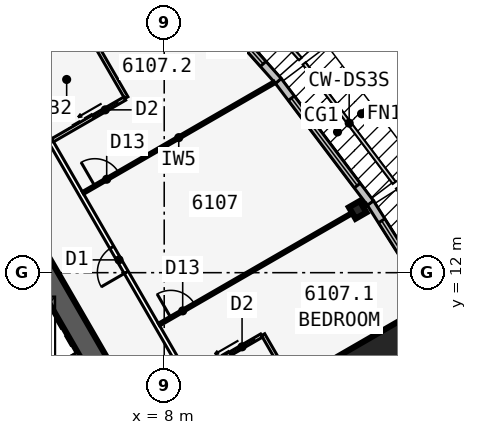
"""IFC4 building model, lengths in metres.
Left out: names, types, materials, properties, quantities, classifications, styles, units other than length and angle.
Written with IfcOpenShell. Run it as: python <this file> out.ifc"""

import sys

from ifc_helpers import new_model, si_unit, direction, frame, frame_2d, origin, origin_2d, place, context, subcontext, project, spatial, rectangle, i_section, extrude, element, fill, save


model = new_model("IFC4")
c1 = context("Model", 3, precision=1e-05, world=origin(), true_north=direction((0.0, 1.0)))
c2 = subcontext(c1, "Body", "Model", "MODEL_VIEW")
j1 = project(units=[si_unit("LENGTHUNIT", "METRE"), si_unit("PLANEANGLEUNIT", "RADIAN")], contexts=[c1])
p1 = place(None, origin())
s1 = spatial("IfcSite", under=j1, at=p1, CompositionType="ELEMENT")
p2 = place(p1, origin())
s2 = spatial("IfcBuilding", under=s1, at=p2, CompositionType="ELEMENT")
p3 = place(p2, frame((0.0, 0.0, 229.7)))
s3 = spatial("IfcBuildingStorey", under=s2, at=p3, CompositionType="ELEMENT", Elevation=229.7)
p4 = place(p3, frame((16.5, -9.526, 0.0), z_axis=(0.0, 0.0, 1.0), x_axis=(-0.499999749417, 0.866025548458, 0.0)))
e1 = element("IfcWall", 1, at=p4, inside=s3, PredefinedType="SHEAR", context=c2, shape_type="SweptSolid", body=[
    extrude(rectangle(XDim=33.0, YDim=0.75, at=frame_2d((16.5, 0.0))), origin(), (0.0, 0.0, 1.0), 3.6),
])
p5 = place(p4, frame((14.15, 0.0, 0.0)))
e2 = element("IfcOpeningElement", 2, at=p5, cuts=e1, PredefinedType="OPENING", context=c2, shape_type="SweptSolid", body=[
    extrude(rectangle(XDim=1.8, YDim=2.13, at=frame_2d((0.9, 1.065))), frame((0.0, 0.385, 0.0), z_axis=(0.0, -1.0, 0.0), x_axis=(1.0, 0.0, 0.0)), (0.0, 0.0, 1.0), 0.77),
])
p6 = place(p4, frame((12.6, 0.0, 0.0)))
e3 = element("IfcOpeningElement", 3, at=p6, cuts=e1, PredefinedType="OPENING", context=c2, shape_type="SweptSolid", body=[
    extrude(rectangle(XDim=1.0, YDim=2.13, at=frame_2d((0.5, 1.065))), frame((0.0, 0.385, 0.0), z_axis=(0.0, -1.0, 0.0), x_axis=(1.0, 0.0, 0.0)), (0.0, 0.0, 1.0), 0.77),
])
p7 = place(p3, frame((5.379, 2.586, 0.0), z_axis=(0.0, 0.0, 1.0), x_axis=(-0.500001375892, 0.866024609411, 0.0)))
e4 = element("IfcWall", 4, at=p7, inside=s3, PredefinedType="SOLIDWALL", context=c2, shape_type="SweptSolid", body=[
    extrude(rectangle(XDim=10.633, YDim=0.25, at=frame_2d((5.316, 0.0))), origin(), (0.0, 0.0, 1.0), 3.35),
])
p8 = place(p7, frame((9.164, 0.0, 0.0)))
e5 = element("IfcOpeningElement", 5, at=p8, cuts=e4, PredefinedType="OPENING", context=c2, shape_type="SweptSolid", body=[
    extrude(rectangle(XDim=0.9, YDim=2.13, at=frame_2d((0.45, 1.065))), frame((0.0, 0.135, 0.0), z_axis=(0.0, -1.0, 0.0), x_axis=(1.0, 0.0, 0.0)), (0.0, 0.0, 1.0), 0.27),
])
p9 = place(p7, frame((1.0, 0.0, 0.0)))
e6 = element("IfcOpeningElement", 6, at=p9, cuts=e4, PredefinedType="OPENING", context=c2, shape_type="SweptSolid", body=[
    extrude(rectangle(XDim=1.1, YDim=2.13, at=frame_2d((0.55, 1.065))), frame((0.0, 0.135, 0.0), z_axis=(0.0, -1.0, 0.0), x_axis=(1.0, 0.0, 0.0)), (0.0, 0.0, 1.0), 0.27),
])
p10 = place(p7, frame((3.9, 0.0, 0.0)))
e7 = element("IfcOpeningElement", 7, at=p10, cuts=e4, PredefinedType="OPENING", context=c2, shape_type="SweptSolid", body=[
    extrude(rectangle(XDim=1.1, YDim=2.13, at=frame_2d((0.55, 1.065))), frame((0.0, 0.135, 0.0), z_axis=(0.0, -1.0, 0.0), x_axis=(1.0, 0.0, 0.0)), (0.0, 0.0, 1.0), 0.27),
])
p11 = place(p7, frame((6.8, 0.0, 0.0)))
e8 = element("IfcOpeningElement", 8, at=p11, cuts=e4, PredefinedType="OPENING", context=c2, shape_type="SweptSolid", body=[
    extrude(rectangle(XDim=1.1, YDim=2.13, at=frame_2d((0.55, 1.065))), frame((0.0, 0.135, 0.0), z_axis=(0.0, -1.0, 0.0), x_axis=(1.0, 0.0, 0.0)), (0.0, 0.0, 1.0), 0.27),
])
p12 = place(p3, frame((2.429, 7.696, 0.0), z_axis=(0.0, 0.0, 1.0), x_axis=(0.866042017984, 0.499971222258, 0.0)))
e9 = element("IfcWall", 9, at=p12, inside=s3, PredefinedType="SOLIDWALL", context=c2, shape_type="SweptSolid", body=[
    extrude(rectangle(XDim=3.2, YDim=0.2, at=frame_2d((1.6, 0.0))), origin(), (0.0, 0.0, 1.0), 3.35),
])
p13 = place(p3, frame((14.363, 14.066, 0.0), z_axis=(0.0, 0.0, 1.0), x_axis=(0.866025403784, 0.5, 0.0)))
e10 = element("IfcColumn", 10, at=p13, inside=s3, PredefinedType="COLUMN", context=c2, shape_type="SweptSolid", body=[
    extrude(i_section(OverallWidth=0.411, OverallDepth=0.434, WebThickness=0.036, FlangeThickness=0.057, at=origin_2d()), origin(), (0.0, 0.0, 1.0), 3.6),
])
p14 = place(p3, frame((15.312, 8.84, 0.0), z_axis=(0.0, 0.0, 1.0), x_axis=(0.866025403784, 0.5, 0.0)))
e11 = element("IfcColumn", 11, at=p14, inside=s3, PredefinedType="COLUMN", context=c2, shape_type="SweptSolid", body=[
    extrude(rectangle(XDim=2.3, YDim=2.3, at=origin_2d()), origin(), (0.0, 0.0, 1.0), 3.6),
])
p15 = place(p3, frame((17.456, 10.072, 0.0), z_axis=(0.0, 0.0, 1.0), x_axis=(-0.535220361449, 0.844712474568, 0.0)))
e12 = element("IfcWall", 12, at=p15, inside=s3, PredefinedType="STANDARD", context=c2, shape_type="SweptSolid", body=[
    extrude(rectangle(XDim=5.004, YDim=0.25, at=frame_2d((2.502, 0.0))), origin(), (0.0, 0.0, 1.0), 3.35),
])
p16 = place(p15, frame((0.702, 0.0, 0.45)))
e13 = element("IfcOpeningElement", 13, at=p16, cuts=e12, PredefinedType="OPENING", context=c2, shape_type="SweptSolid", body=[
    extrude(rectangle(XDim=3.6, YDim=2.6, at=frame_2d((1.8, 1.3))), frame((0.0, 0.135, 0.0), z_axis=(0.0, -1.0, 0.0), x_axis=(1.0, 0.0, 0.0)), (0.0, 0.0, 1.0), 0.27),
])
p17 = place(p3, frame((14.783, 14.291, 0.0), z_axis=(0.0, 0.0, 1.0), x_axis=(-0.602408653511, 0.798187831388, 0.0)))
e14 = element("IfcWall", 14, at=p17, inside=s3, PredefinedType="STANDARD", context=c2, shape_type="SweptSolid", body=[
    extrude(rectangle(XDim=5.038, YDim=0.25, at=frame_2d((2.519, 0.0))), origin(), (0.0, 0.0, 1.0), 3.35),
])
p18 = place(p17, frame((0.719, 0.0, 0.45)))
e15 = element("IfcOpeningElement", 15, at=p18, cuts=e14, PredefinedType="OPENING", context=c2, shape_type="SweptSolid", body=[
    extrude(rectangle(XDim=3.6, YDim=2.6, at=frame_2d((1.8, 1.3))), frame((0.0, 0.135, 0.0), z_axis=(0.0, -1.0, 0.0), x_axis=(1.0, 0.0, 0.0)), (0.0, 0.0, 1.0), 0.27),
])
p19 = place(p3, frame((11.754, 18.304, 0.0), z_axis=(0.0, 0.0, 1.0), x_axis=(-0.664348996191, 0.747422511876, 0.0)))
e16 = element("IfcWall", 16, at=p19, inside=s3, PredefinedType="STANDARD", context=c2, shape_type="SweptSolid", body=[
    extrude(rectangle(XDim=5.105, YDim=0.25, at=frame_2d((2.552, 0.0))), origin(), (0.0, 0.0, 1.0), 3.35),
])
p20 = place(p19, frame((0.752, 0.0, 0.45)))
e17 = element("IfcOpeningElement", 17, at=p20, cuts=e16, PredefinedType="OPENING", context=c2, shape_type="SweptSolid", body=[
    extrude(rectangle(XDim=3.6, YDim=2.6, at=frame_2d((1.8, 1.3))), frame((0.0, 0.135, 0.0), z_axis=(0.0, -1.0, 0.0), x_axis=(1.0, 0.0, 0.0)), (0.0, 0.0, 1.0), 0.27),
])
p21 = place(p3, frame((20.102, -11.115, 0.0), z_axis=(0.0, 0.0, 1.0), x_axis=(-0.500000265775, 0.866025250339, 0.0)))
e18 = element("IfcWall", 18, at=p21, inside=s3, PredefinedType="PARTITIONING", context=c2, shape_type="SweptSolid", body=[
    extrude(rectangle(XDim=39.354, YDim=0.15, at=frame_2d((19.677, 0.0))), origin(), (0.0, 0.0, 1.0), 3.35),
])
p22 = place(p21, frame((1.102, 0.0, 0.0)))
e19 = element("IfcOpeningElement", 19, at=p22, cuts=e18, PredefinedType="OPENING", context=c2, shape_type="SweptSolid", body=[
    extrude(rectangle(XDim=0.95, YDim=2.13, at=frame_2d((0.475, 1.065))), frame((0.0, 0.085, 0.0), z_axis=(0.0, -1.0, 0.0), x_axis=(1.0, 0.0, 0.0)), (0.0, 0.0, 1.0), 0.17),
])
p23 = place(p21, frame((11.702, 0.0, 0.0)))
e20 = element("IfcOpeningElement", 20, at=p23, cuts=e18, PredefinedType="OPENING", context=c2, shape_type="SweptSolid", body=[
    extrude(rectangle(XDim=0.95, YDim=2.13, at=frame_2d((0.475, 1.065))), frame((0.0, 0.085, 0.0), z_axis=(0.0, -1.0, 0.0), x_axis=(1.0, 0.0, 0.0)), (0.0, 0.0, 1.0), 0.17),
])
p24 = place(p21, frame((26.702, 0.0, 0.0)))
e21 = element("IfcOpeningElement", 21, at=p24, cuts=e18, PredefinedType="OPENING", context=c2, shape_type="SweptSolid", body=[
    extrude(rectangle(XDim=0.95, YDim=2.13, at=frame_2d((0.475, 1.065))), frame((0.0, 0.085, 0.0), z_axis=(0.0, -1.0, 0.0), x_axis=(1.0, 0.0, 0.0)), (0.0, 0.0, 1.0), 0.17),
])
p25 = place(p21, frame((37.302, 0.0, 0.0)))
e22 = element("IfcOpeningElement", 22, at=p25, cuts=e18, PredefinedType="OPENING", context=c2, shape_type="SweptSolid", body=[
    extrude(rectangle(XDim=0.95, YDim=2.13, at=frame_2d((0.475, 1.065))), frame((0.0, 0.085, 0.0), z_axis=(0.0, -1.0, 0.0), x_axis=(1.0, 0.0, 0.0)), (0.0, 0.0, 1.0), 0.17),
])
p26 = place(p3, frame((10.329, 5.963, 0.0), z_axis=(0.0, 0.0, 1.0), x_axis=(0.866016460812, 0.500015489362, 0.0)))
e23 = element("IfcWall", 23, at=p26, inside=s3, PredefinedType="PARTITIONING", context=c2, shape_type="SweptSolid", body=[
    extrude(rectangle(XDim=8.101, YDim=0.15, at=frame_2d((4.051, 0.0))), origin(), (0.0, 0.0, 1.0), 2.309),
])
p27 = place(p3, frame((7.829, 10.293, 0.0), z_axis=(0.0, 0.0, 1.0), x_axis=(0.866030558329, 0.49999107196, 0.0)))
e24 = element("IfcWall", 24, at=p27, inside=s3, PredefinedType="PARTITIONING", context=c2, shape_type="SweptSolid", body=[
    extrude(rectangle(XDim=7.894, YDim=0.1, at=frame_2d((3.947, 0.0))), origin(), (0.0, 0.0, 1.0), 2.25),
])
p28 = place(p27, frame((0.45, 0.0, 0.0)))
e25 = element("IfcOpeningElement", 25, at=p28, cuts=e24, PredefinedType="OPENING", context=c2, shape_type="SweptSolid", body=[
    extrude(rectangle(XDim=0.9, YDim=2.13, at=frame_2d((0.45, 1.065))), frame((0.0, 0.06, 0.0), z_axis=(0.0, -1.0, 0.0), x_axis=(1.0, 0.0, 0.0)), (0.0, 0.0, 1.0), 0.12),
])
p29 = place(p3, frame((5.329, 14.623, 0.0), z_axis=(0.0, 0.0, 1.0), x_axis=(0.866017877653, 0.500013035415, 0.0)))
e26 = element("IfcWall", 26, at=p29, inside=s3, PredefinedType="PARTITIONING", context=c2, shape_type="SweptSolid", body=[
    extrude(rectangle(XDim=7.273, YDim=0.1, at=frame_2d((3.636, 0.0))), origin(), (0.0, 0.0, 1.0), 2.309),
])
p30 = place(p29, frame((0.45, 0.0, 0.0)))
e27 = element("IfcOpeningElement", 27, at=p30, cuts=e26, PredefinedType="OPENING", context=c2, shape_type="SweptSolid", body=[
    extrude(rectangle(XDim=0.9, YDim=2.13, at=frame_2d((0.45, 1.065))), frame((0.0, 0.06, 0.0), z_axis=(0.0, -1.0, 0.0), x_axis=(1.0, 0.0, 0.0)), (0.0, 0.0, 1.0), 0.12),
])
p31 = place(p3, frame((2.829, 18.954, 0.0), z_axis=(0.0, 0.0, 1.0), x_axis=(0.866026604282, 0.499997920671, 0.0)))
e28 = element("IfcWall", 28, at=p31, inside=s3, PredefinedType="PARTITIONING", context=c2, shape_type="SweptSolid", body=[
    extrude(rectangle(XDim=6.24, YDim=0.15, at=frame_2d((3.12, 0.0))), origin(), (0.0, 0.0, 1.0), 2.25),
])
p32 = place(p3, frame((12.753, 7.363, 0.0), z_axis=(0.0, 0.0, 1.0), x_axis=(-0.499990139034, 0.866031096941, 0.0)))
e29 = element("IfcWall", 29, at=p32, inside=s3, PredefinedType="PLUMBINGWALL", context=c2, shape_type="SweptSolid", body=[
    extrude(rectangle(XDim=3.0, YDim=0.12, at=frame_2d((1.5, 0.0))), origin(), (0.0, 0.0, 1.0), 3.35),
])
p33 = place(p3, frame((8.829, 8.561, 0.0), z_axis=(0.0, 0.0, 1.0), x_axis=(0.866035715982, 0.499982138324, 0.0)))
e30 = element("IfcWall", 30, at=p33, inside=s3, PredefinedType="PLUMBINGWALL", context=c2, shape_type="SweptSolid", body=[
    extrude(rectangle(XDim=2.74, YDim=0.12, at=frame_2d((1.37, 0.0))), origin(), (0.0, 0.0, 1.0), 3.35),
])
p34 = place(p33, frame((1.55, 0.0, 0.0)))
e31 = element("IfcOpeningElement", 31, at=p34, cuts=e30, PredefinedType="OPENING", context=c2, shape_type="SweptSolid", body=[
    extrude(rectangle(XDim=0.9, YDim=2.13, at=frame_2d((0.45, 1.065))), frame((0.0, 0.07, 0.0), z_axis=(0.0, -1.0, 0.0), x_axis=(1.0, 0.0, 0.0)), (0.0, 0.0, 1.0), 0.14),
])
p35 = place(p3, frame((6.753, 17.755, 0.0), z_axis=(0.0, 0.0, 1.0), x_axis=(-0.499990139034, 0.866031096941, 0.0)))
e32 = element("IfcWall", 32, at=p35, inside=s3, PredefinedType="PLUMBINGWALL", context=c2, shape_type="SweptSolid", body=[
    extrude(rectangle(XDim=3.0, YDim=0.12, at=frame_2d((1.5, 0.0))), origin(), (0.0, 0.0, 1.0), 3.35),
])
p36 = place(p3, frame((4.329, 16.355, 0.0), z_axis=(0.0, 0.0, 1.0), x_axis=(0.866035715982, 0.499982138324, 0.0)))
e33 = element("IfcWall", 33, at=p36, inside=s3, PredefinedType="PLUMBINGWALL", context=c2, shape_type="SweptSolid", body=[
    extrude(rectangle(XDim=2.74, YDim=0.12, at=frame_2d((1.37, 0.0))), origin(), (0.0, 0.0, 1.0), 3.35),
])
p37 = place(p36, frame((1.55, 0.0, 0.0)))
e34 = element("IfcOpeningElement", 34, at=p37, cuts=e33, PredefinedType="OPENING", context=c2, shape_type="SweptSolid", body=[
    extrude(rectangle(XDim=0.9, YDim=2.13, at=frame_2d((0.45, 1.065))), frame((0.0, 0.07, 0.0), z_axis=(0.0, -1.0, 0.0), x_axis=(1.0, 0.0, 0.0)), (0.0, 0.0, 1.0), 0.14),
])
p38 = place(p16, origin())
e35 = element("IfcWindow", 35, at=p38, inside=s3, PartitioningType="SINGLE_PANEL", PredefinedType="WINDOW", context=c2, shape_type="SweptSolid", body=[
    extrude(rectangle(XDim=3.6, YDim=2.6, at=frame_2d((1.8, 1.3))), frame((0.0, 0.03, 0.0), z_axis=(0.0, -1.0, 0.0), x_axis=(1.0, 0.0, 0.0)), (0.0, 0.0, 1.0), 0.06),
])
fill(e13, e35)
p39 = place(p18, origin())
e36 = element("IfcWindow", 36, at=p39, inside=s3, PartitioningType="SINGLE_PANEL", PredefinedType="WINDOW", context=c2, shape_type="SweptSolid", body=[
    extrude(rectangle(XDim=3.6, YDim=2.6, at=frame_2d((1.8, 1.3))), frame((0.0, 0.03, 0.0), z_axis=(0.0, -1.0, 0.0), x_axis=(1.0, 0.0, 0.0)), (0.0, 0.0, 1.0), 0.06),
])
fill(e15, e36)
p40 = place(p20, origin())
e37 = element("IfcWindow", 37, at=p40, inside=s3, PartitioningType="SINGLE_PANEL", PredefinedType="WINDOW", context=c2, shape_type="SweptSolid", body=[
    extrude(rectangle(XDim=3.6, YDim=2.6, at=frame_2d((1.8, 1.3))), frame((0.0, 0.03, 0.0), z_axis=(0.0, -1.0, 0.0), x_axis=(1.0, 0.0, 0.0)), (0.0, 0.0, 1.0), 0.06),
])
fill(e17, e37)
p41 = place(p28, origin())
e38 = element("IfcDoor", 38, at=p41, inside=s3, OperationType="SINGLE_SWING_LEFT", PredefinedType="DOOR", context=c2, shape_type="SweptSolid", body=[
    extrude(rectangle(XDim=0.9, YDim=2.13, at=frame_2d((0.45, 1.065))), frame((0.0, 0.025, 0.0), z_axis=(0.0, -1.0, 0.0), x_axis=(1.0, 0.0, 0.0)), (0.0, 0.0, 1.0), 0.05),
])
fill(e25, e38)
p42 = place(p30, origin())
e39 = element("IfcDoor", 39, at=p42, inside=s3, OperationType="SINGLE_SWING_LEFT", PredefinedType="DOOR", context=c2, shape_type="SweptSolid", body=[
    extrude(rectangle(XDim=0.9, YDim=2.13, at=frame_2d((0.45, 1.065))), frame((0.0, 0.025, 0.0), z_axis=(0.0, -1.0, 0.0), x_axis=(1.0, 0.0, 0.0)), (0.0, 0.0, 1.0), 0.05),
])
fill(e27, e39)
p43 = place(p34, origin())
e40 = element("IfcDoor", 40, at=p43, inside=s3, OperationType="SLIDING_TO_LEFT", PredefinedType="DOOR", context=c2, shape_type="SweptSolid", body=[
    extrude(rectangle(XDim=0.9, YDim=2.13, at=frame_2d((0.45, 1.065))), frame((0.0, 0.025, 0.0), z_axis=(0.0, -1.0, 0.0), x_axis=(1.0, 0.0, 0.0)), (0.0, 0.0, 1.0), 0.05),
])
fill(e31, e40)
p44 = place(p24, origin())
e41 = element("IfcDoor", 41, at=p44, inside=s3, OperationType="SINGLE_SWING_LEFT", PredefinedType="DOOR", context=c2, shape_type="SweptSolid", body=[
    extrude(rectangle(XDim=0.95, YDim=2.13, at=frame_2d((0.475, 1.065))), frame((0.0, 0.025, 0.0), z_axis=(0.0, -1.0, 0.0), x_axis=(1.0, 0.0, 0.0)), (0.0, 0.0, 1.0), 0.05),
])
fill(e21, e41)
p45 = place(p37, origin())
e42 = element("IfcDoor", 42, at=p45, inside=s3, OperationType="SLIDING_TO_LEFT", PredefinedType="DOOR", context=c2, shape_type="SweptSolid", body=[
    extrude(rectangle(XDim=0.9, YDim=2.13, at=frame_2d((0.45, 1.065))), frame((0.0, 0.025, 0.0), z_axis=(0.0, -1.0, 0.0), x_axis=(1.0, 0.0, 0.0)), (0.0, 0.0, 1.0), 0.05),
])
fill(e34, e42)
save(model, sys.argv[1])
